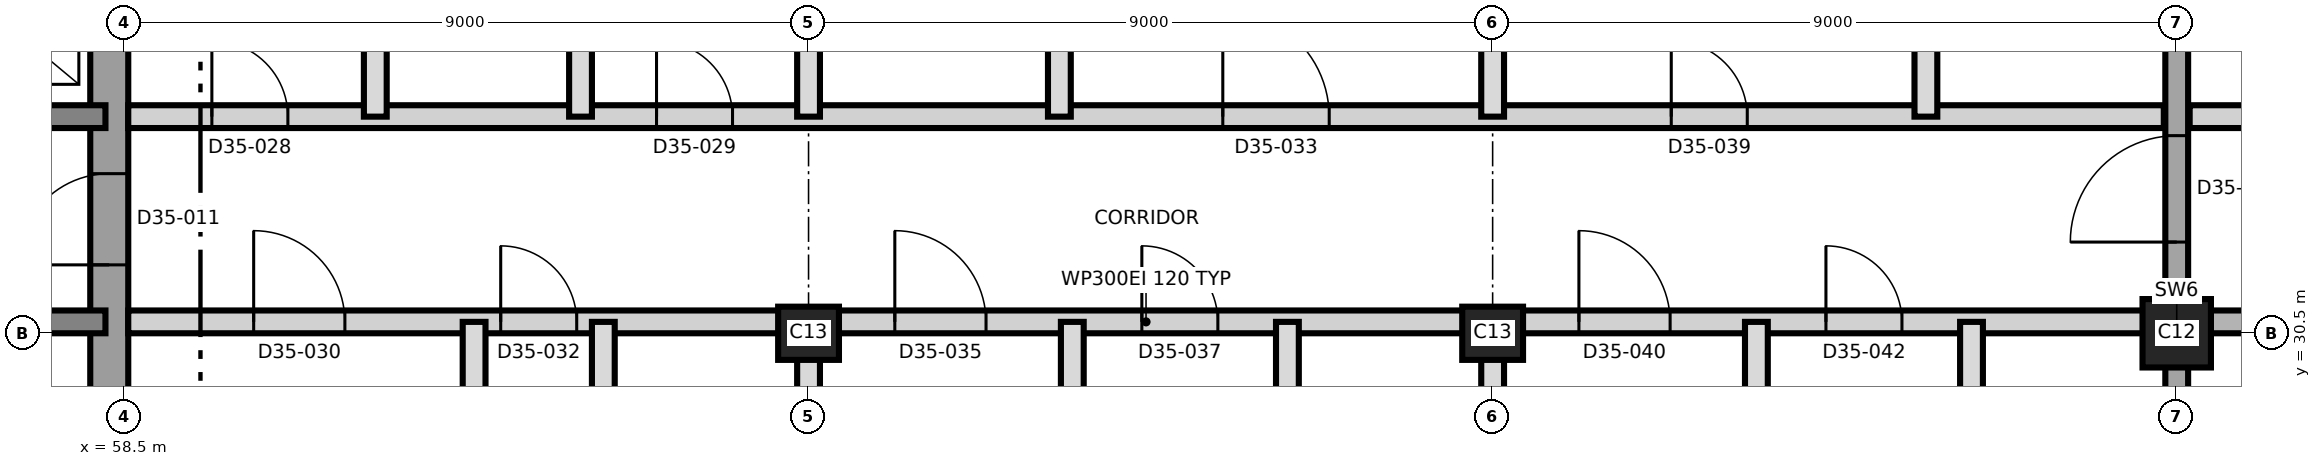
"""IFC4 building model, lengths in metres.
Left out: names, types, materials, properties, quantities, classifications, styles, units other than length and angle.
Written with IfcOpenShell. Run it as: python <this file> out.ifc"""

import sys

from ifc_helpers import new_model, si_unit, direction, frame, frame_2d, origin, origin_2d, place, context, subcontext, project, spatial, rectangle, extrude, element, fill, save


model = new_model("IFC4")
c1 = context("Model", 3, precision=1e-05, world=origin(), true_north=direction((0.0, 1.0)))
c2 = subcontext(c1, "Body", "Model", "MODEL_VIEW")
j1 = project(units=[si_unit("LENGTHUNIT", "METRE"), si_unit("PLANEANGLEUNIT", "RADIAN")], contexts=[c1])
p1 = place(None, origin())
s1 = spatial("IfcSite", under=j1, at=p1, CompositionType="ELEMENT")
p2 = place(p1, origin())
s2 = spatial("IfcBuilding", under=s1, at=p2, CompositionType="ELEMENT")
p3 = place(p2, frame((0.0, 0.0, 195.8)))
s3 = spatial("IfcBuildingStorey", under=s2, at=p3, CompositionType="ELEMENT", Elevation=195.8)
p4 = place(p3, frame((58.3, 21.25, 0.0), z_axis=(0.0, 0.0, 1.0), x_axis=(0.0, 1.0, 0.0)))
e1 = element("IfcWall", 1, at=p4, inside=s3, PredefinedType="SHEAR", context=c2, shape_type="SweptSolid", body=[
    extrude(rectangle(XDim=18.5, YDim=0.5, at=frame_2d((9.25, 0.0))), origin(), (0.0, 0.0, 1.0), 3.7),
])
p5 = place(p4, frame((10.15, 0.0, 0.0)))
e2 = element("IfcOpeningElement", 2, at=p5, cuts=e1, PredefinedType="OPENING", context=c2, shape_type="SweptSolid", body=[
    extrude(rectangle(XDim=1.2, YDim=2.1, at=frame_2d((0.6, 1.05))), frame((0.0, 0.26, 0.0), z_axis=(0.0, -1.0, 0.0), x_axis=(1.0, 0.0, 0.0)), (0.0, 0.0, 1.0), 0.52),
])
p6 = place(p3, frame((31.75, 30.65, 0.0), z_axis=(0.0, 0.0, 1.0), x_axis=(1.0, 0.0, 0.0)))
e3 = element("IfcWall", 3, at=p6, inside=s3, PredefinedType="SHEAR", context=c2, shape_type="SweptSolid", body=[
    extrude(rectangle(XDim=26.5, YDim=0.3, at=frame_2d((13.25, 0.0))), origin(), (0.0, 0.0, 1.0), 3.7),
])
p7 = place(p6, frame((24.75, 0.0, 0.0)))
e4 = element("IfcOpeningElement", 4, at=p7, cuts=e3, PredefinedType="OPENING", context=c2, shape_type="SweptSolid", body=[
    extrude(rectangle(XDim=1.0, YDim=2.1, at=frame_2d((0.5, 1.05))), frame((0.0, 0.16, 0.0), z_axis=(0.0, -1.0, 0.0), x_axis=(1.0, 0.0, 0.0)), (0.0, 0.0, 1.0), 0.32),
])
p8 = place(p6, frame((4.05, 0.0, 0.0)))
e5 = element("IfcOpeningElement", 5, at=p8, cuts=e3, PredefinedType="OPENING", context=c2, shape_type="SweptSolid", body=[
    extrude(rectangle(XDim=1.0, YDim=2.1, at=frame_2d((0.5, 1.05))), frame((0.0, 0.16, 0.0), z_axis=(0.0, -1.0, 0.0), x_axis=(1.0, 0.0, 0.0)), (0.0, 0.0, 1.0), 0.32),
])
p9 = place(p3, frame((31.75, 33.35, 0.0), z_axis=(0.0, 0.0, 1.0), x_axis=(1.0, 0.0, 0.0)))
e6 = element("IfcWall", 6, at=p9, inside=s3, PredefinedType="SHEAR", context=c2, shape_type="SweptSolid", body=[
    extrude(rectangle(XDim=26.5, YDim=0.3, at=frame_2d((13.25, 0.0))), origin(), (0.0, 0.0, 1.0), 3.7),
])
p10 = place(p9, frame((13.9, 0.0, 0.0)))
e7 = element("IfcOpeningElement", 7, at=p10, cuts=e6, PredefinedType="OPENING", context=c2, shape_type="SweptSolid", body=[
    extrude(rectangle(XDim=1.4, YDim=2.1, at=frame_2d((0.7, 1.05))), frame((0.0, 0.16, 0.0), z_axis=(0.0, -1.0, 0.0), x_axis=(1.0, 0.0, 0.0)), (0.0, 0.0, 1.0), 0.32),
])
p11 = place(p9, frame((5.375, 0.0, 0.0)))
e8 = element("IfcOpeningElement", 8, at=p11, cuts=e6, PredefinedType="OPENING", context=c2, shape_type="SweptSolid", body=[
    extrude(rectangle(XDim=1.2, YDim=2.1, at=frame_2d((0.6, 1.05))), frame((0.0, 0.16, 0.0), z_axis=(0.0, -1.0, 0.0), x_axis=(1.0, 0.0, 0.0)), (0.0, 0.0, 1.0), 0.32),
])
p12 = place(p9, frame((19.925, 0.0, 0.0)))
e9 = element("IfcOpeningElement", 9, at=p12, cuts=e6, PredefinedType="OPENING", context=c2, shape_type="SweptSolid", body=[
    extrude(rectangle(XDim=1.2, YDim=2.1, at=frame_2d((0.6, 1.05))), frame((0.0, 0.16, 0.0), z_axis=(0.0, -1.0, 0.0), x_axis=(1.0, 0.0, 0.0)), (0.0, 0.0, 1.0), 0.32),
])
for number, where, z_axis, x_axis in (
    (10, (67.5, 30.5, 0.0), (0.0, 0.0, 1.0), (1.0, 0.0, 0.0)),
    (11, (76.5, 30.5, 0.0), (0.0, 0.0, 1.0), (1.0, 0.0, 0.0)),
):
    element("IfcColumn", number, at=place(p3, frame(where, z_axis=z_axis, x_axis=x_axis)), inside=s3, PredefinedType="COLUMN", context=c2, shape_type="SweptSolid", body=[
        extrude(rectangle(XDim=0.8, YDim=0.7, at=origin_2d()), origin(), (0.0, 0.0, 1.0), 3.7),
    ])
p13 = place(p3, frame((85.5, 30.5, 0.0), z_axis=(0.0, 0.0, 1.0), x_axis=(1.0, 0.0, 0.0)))
e12 = element("IfcColumn", 12, at=p13, inside=s3, PredefinedType="COLUMN", context=c2, shape_type="SweptSolid", body=[
    extrude(rectangle(XDim=0.9, YDim=0.9, at=origin_2d()), origin(), (0.0, 0.0, 1.0), 3.7),
])
p14 = place(p3, frame((85.5, 20.135, 0.0), z_axis=(0.0, 0.0, 1.0), x_axis=(0.0, 1.0, 0.0)))
e13 = element("IfcWall", 13, at=p14, inside=s3, PredefinedType="SHEAR", context=c2, shape_type="SweptSolid", body=[
    extrude(rectangle(XDim=20.73, YDim=0.3, at=frame_2d((10.365, 0.0))), origin(), (0.0, 0.0, 1.0), 3.7),
])
p15 = place(p14, frame((11.565, 0.0, 0.0)))
e14 = element("IfcOpeningElement", 14, at=p15, cuts=e13, PredefinedType="OPENING", context=c2, shape_type="SweptSolid", body=[
    extrude(rectangle(XDim=1.4, YDim=2.1, at=frame_2d((0.7, 1.05))), frame((0.0, 0.16, 0.0), z_axis=(0.0, -1.0, 0.0), x_axis=(1.0, 0.0, 0.0)), (0.0, 0.0, 1.0), 0.32),
])
p16 = place(p3, frame((58.55, 30.65, 0.0), z_axis=(0.0, 0.0, 1.0), x_axis=(1.0, 0.0, 0.0)))
e15 = element("IfcWall", 15, at=p16, inside=s3, PredefinedType="PARTITIONING", context=c2, shape_type="SweptSolid", body=[
    extrude(rectangle(XDim=26.78, YDim=0.3, at=frame_2d((13.39, 0.0))), origin(), (0.0, 0.0, 1.0), 3.4),
])
p17 = place(p16, frame((1.65, 0.0, 0.0)))
e16 = element("IfcOpeningElement", 16, at=p17, cuts=e15, PredefinedType="OPENING", context=c2, shape_type="SweptSolid", body=[
    extrude(rectangle(XDim=1.2, YDim=2.1, at=frame_2d((0.6, 1.05))), frame((0.0, 0.16, 0.0), z_axis=(0.0, -1.0, 0.0), x_axis=(1.0, 0.0, 0.0)), (0.0, 0.0, 1.0), 0.32),
])
p18 = place(p16, frame((4.9, 0.0, 0.0)))
e17 = element("IfcOpeningElement", 17, at=p18, cuts=e15, PredefinedType="OPENING", context=c2, shape_type="SweptSolid", body=[
    extrude(rectangle(XDim=1.0, YDim=2.1, at=frame_2d((0.5, 1.05))), frame((0.0, 0.16, 0.0), z_axis=(0.0, -1.0, 0.0), x_axis=(1.0, 0.0, 0.0)), (0.0, 0.0, 1.0), 0.32),
])
p19 = place(p16, frame((10.085, 0.0, 0.0)))
e18 = element("IfcOpeningElement", 18, at=p19, cuts=e15, PredefinedType="OPENING", context=c2, shape_type="SweptSolid", body=[
    extrude(rectangle(XDim=1.2, YDim=2.1, at=frame_2d((0.6, 1.05))), frame((0.0, 0.16, 0.0), z_axis=(0.0, -1.0, 0.0), x_axis=(1.0, 0.0, 0.0)), (0.0, 0.0, 1.0), 0.32),
])
p20 = place(p16, frame((13.335, 0.0, 0.0)))
e19 = element("IfcOpeningElement", 19, at=p20, cuts=e15, PredefinedType="OPENING", context=c2, shape_type="SweptSolid", body=[
    extrude(rectangle(XDim=1.0, YDim=2.1, at=frame_2d((0.5, 1.05))), frame((0.0, 0.16, 0.0), z_axis=(0.0, -1.0, 0.0), x_axis=(1.0, 0.0, 0.0)), (0.0, 0.0, 1.0), 0.32),
])
p21 = place(p16, frame((19.085, 0.0, 0.0)))
e20 = element("IfcOpeningElement", 20, at=p21, cuts=e15, PredefinedType="OPENING", context=c2, shape_type="SweptSolid", body=[
    extrude(rectangle(XDim=1.2, YDim=2.1, at=frame_2d((0.6, 1.05))), frame((0.0, 0.16, 0.0), z_axis=(0.0, -1.0, 0.0), x_axis=(1.0, 0.0, 0.0)), (0.0, 0.0, 1.0), 0.32),
])
p22 = place(p16, frame((22.335, 0.0, 0.0)))
e21 = element("IfcOpeningElement", 21, at=p22, cuts=e15, PredefinedType="OPENING", context=c2, shape_type="SweptSolid", body=[
    extrude(rectangle(XDim=1.0, YDim=2.1, at=frame_2d((0.5, 1.05))), frame((0.0, 0.16, 0.0), z_axis=(0.0, -1.0, 0.0), x_axis=(1.0, 0.0, 0.0)), (0.0, 0.0, 1.0), 0.32),
])
p23 = place(p3, frame((85.67, 30.65, 0.0), z_axis=(0.0, 0.0, 1.0), x_axis=(1.0, 0.0, 0.0)))
e22 = element("IfcWall", 22, at=p23, inside=s3, PredefinedType="SHEAR", context=c2, shape_type="SweptSolid", body=[
    extrude(rectangle(XDim=9.58, YDim=0.3, at=frame_2d((4.79, 0.0))), origin(), (0.0, 0.0, 1.0), 3.4),
])
p24 = place(p23, frame((2.08, 0.0, 0.0)))
e23 = element("IfcOpeningElement", 23, at=p24, cuts=e22, PredefinedType="OPENING", context=c2, shape_type="SweptSolid", body=[
    extrude(rectangle(XDim=1.2, YDim=2.1, at=frame_2d((0.6, 1.05))), frame((0.0, 0.16, 0.0), z_axis=(0.0, -1.0, 0.0), x_axis=(1.0, 0.0, 0.0)), (0.0, 0.0, 1.0), 0.32),
])
p25 = place(p23, frame((5.63, 0.0, 0.0)))
e24 = element("IfcOpeningElement", 24, at=p25, cuts=e22, PredefinedType="OPENING", context=c2, shape_type="SweptSolid", body=[
    extrude(rectangle(XDim=1.0, YDim=2.1, at=frame_2d((0.5, 1.05))), frame((0.0, 0.16, 0.0), z_axis=(0.0, -1.0, 0.0), x_axis=(1.0, 0.0, 0.0)), (0.0, 0.0, 1.0), 0.32),
])
p26 = place(p3, frame((58.55, 33.35, 0.0), z_axis=(0.0, 0.0, 1.0), x_axis=(1.0, 0.0, 0.0)))
e25 = element("IfcWall", 25, at=p26, inside=s3, PredefinedType="PARTITIONING", context=c2, shape_type="SweptSolid", body=[
    extrude(rectangle(XDim=26.78, YDim=0.3, at=frame_2d((13.39, 0.0))), origin(), (0.0, 0.0, 1.0), 3.4),
])
p27 = place(p26, frame((1.1, 0.0, 0.0)))
e26 = element("IfcOpeningElement", 26, at=p27, cuts=e25, PredefinedType="OPENING", context=c2, shape_type="SweptSolid", body=[
    extrude(rectangle(XDim=1.0, YDim=2.1, at=frame_2d((0.5, 1.05))), frame((0.0, 0.16, 0.0), z_axis=(0.0, -1.0, 0.0), x_axis=(1.0, 0.0, 0.0)), (0.0, 0.0, 1.0), 0.32),
])
p28 = place(p26, frame((6.95, 0.0, 0.0)))
e27 = element("IfcOpeningElement", 27, at=p28, cuts=e25, PredefinedType="OPENING", context=c2, shape_type="SweptSolid", body=[
    extrude(rectangle(XDim=1.0, YDim=2.1, at=frame_2d((0.5, 1.05))), frame((0.0, 0.16, 0.0), z_axis=(0.0, -1.0, 0.0), x_axis=(1.0, 0.0, 0.0)), (0.0, 0.0, 1.0), 0.32),
])
p29 = place(p26, frame((14.4, 0.0, 0.0)))
e28 = element("IfcOpeningElement", 28, at=p29, cuts=e25, PredefinedType="OPENING", context=c2, shape_type="SweptSolid", body=[
    extrude(rectangle(XDim=1.4, YDim=2.4, at=frame_2d((0.7, 1.2))), frame((0.0, 0.16, 0.0), z_axis=(0.0, -1.0, 0.0), x_axis=(1.0, 0.0, 0.0)), (0.0, 0.0, 1.0), 0.32),
])
p30 = place(p26, frame((20.3, 0.0, 0.0)))
e29 = element("IfcOpeningElement", 29, at=p30, cuts=e25, PredefinedType="OPENING", context=c2, shape_type="SweptSolid", body=[
    extrude(rectangle(XDim=1.0, YDim=2.4, at=frame_2d((0.5, 1.2))), frame((0.0, 0.16, 0.0), z_axis=(0.0, -1.0, 0.0), x_axis=(1.0, 0.0, 0.0)), (0.0, 0.0, 1.0), 0.32),
])
p31 = place(p3, frame((85.67, 33.35, 0.0), z_axis=(0.0, 0.0, 1.0), x_axis=(1.0, 0.0, 0.0)))
e30 = element("IfcWall", 30, at=p31, inside=s3, PredefinedType="PARTITIONING", context=c2, shape_type="SweptSolid", body=[
    extrude(rectangle(XDim=9.58, YDim=0.3, at=frame_2d((4.79, 0.0))), origin(), (0.0, 0.0, 1.0), 3.4),
])
p32 = place(p31, frame((1.83, 0.0, 0.0)))
e31 = element("IfcOpeningElement", 31, at=p32, cuts=e30, PredefinedType="OPENING", context=c2, shape_type="SweptSolid", body=[
    extrude(rectangle(XDim=1.0, YDim=2.1, at=frame_2d((0.5, 1.05))), frame((0.0, 0.16, 0.0), z_axis=(0.0, -1.0, 0.0), x_axis=(1.0, 0.0, 0.0)), (0.0, 0.0, 1.0), 0.32),
])
p33 = place(p31, frame((5.63, 0.0, 0.0)))
e32 = element("IfcOpeningElement", 32, at=p33, cuts=e30, PredefinedType="OPENING", context=c2, shape_type="SweptSolid", body=[
    extrude(rectangle(XDim=1.0, YDim=2.1, at=frame_2d((0.5, 1.05))), frame((0.0, 0.16, 0.0), z_axis=(0.0, -1.0, 0.0), x_axis=(1.0, 0.0, 0.0)), (0.0, 0.0, 1.0), 0.32),
])
p34 = place(p3, frame((61.8, 33.35, 0.0), z_axis=(0.0, 0.0, 1.0), x_axis=(0.0, 1.0, 0.0)))
e33 = element("IfcWall", 33, at=p34, inside=s3, PredefinedType="PARTITIONING", context=c2, shape_type="SweptSolid", body=[
    extrude(rectangle(XDim=3.2, YDim=0.3, at=frame_2d((1.6, 0.0))), origin(), (0.0, 0.0, 1.0), 3.4),
])
p35 = place(p3, frame((63.1, 20.135, 0.0), z_axis=(0.0, 0.0, 1.0), x_axis=(0.0, 1.0, 0.0)))
e34 = element("IfcWall", 34, at=p35, inside=s3, PredefinedType="PARTITIONING", context=c2, shape_type="SweptSolid", body=[
    extrude(rectangle(XDim=10.515, YDim=0.3, at=frame_2d((5.257, 0.0))), origin(), (0.0, 0.0, 1.0), 3.4),
])
p36 = place(p3, frame((64.5, 33.35, 0.0), z_axis=(0.0, 0.0, 1.0), x_axis=(0.0, 1.0, 0.0)))
e35 = element("IfcWall", 35, at=p36, inside=s3, PredefinedType="PARTITIONING", context=c2, shape_type="SweptSolid", body=[
    extrude(rectangle(XDim=7.695, YDim=0.3, at=frame_2d((3.847, 0.0))), origin(), (0.0, 0.0, 1.0), 3.4),
])
p37 = place(p3, frame((64.8, 27.45, 0.0), z_axis=(0.0, 0.0, 1.0), x_axis=(0.0, 1.0, 0.0)))
e36 = element("IfcWall", 36, at=p37, inside=s3, PredefinedType="PARTITIONING", context=c2, shape_type="SweptSolid", body=[
    extrude(rectangle(XDim=3.2, YDim=0.3, at=frame_2d((1.6, 0.0))), origin(), (0.0, 0.0, 1.0), 3.4),
])
p38 = place(p3, frame((67.5, 20.135, 0.0), z_axis=(0.0, 0.0, 1.0), x_axis=(0.0, 1.0, 0.0)))
e37 = element("IfcWall", 37, at=p38, inside=s3, PredefinedType="PARTITIONING", context=c2, shape_type="SweptSolid", body=[
    extrude(rectangle(XDim=10.515, YDim=0.3, at=frame_2d((5.257, 0.0))), origin(), (0.0, 0.0, 1.0), 3.4),
])
p39 = place(p3, frame((67.5, 33.35, 0.0), z_axis=(0.0, 0.0, 1.0), x_axis=(0.0, 1.0, 0.0)))
e38 = element("IfcWall", 38, at=p39, inside=s3, PredefinedType="PARTITIONING", context=c2, shape_type="SweptSolid", body=[
    extrude(rectangle(XDim=7.655, YDim=0.3, at=frame_2d((3.827, 0.0))), origin(), (0.0, 0.0, 1.0), 3.4),
])
p40 = place(p3, frame((70.8, 33.35, 0.0), z_axis=(0.0, 0.0, 1.0), x_axis=(0.0, 1.0, 0.0)))
e39 = element("IfcWall", 39, at=p40, inside=s3, PredefinedType="PARTITIONING", context=c2, shape_type="SweptSolid", body=[
    extrude(rectangle(XDim=3.5, YDim=0.3, at=frame_2d((1.75, 0.0))), origin(), (0.0, 0.0, 1.0), 3.4),
])
p41 = place(p3, frame((70.97, 20.135, 0.0), z_axis=(0.0, 0.0, 1.0), x_axis=(0.0, 1.0, 0.0)))
e40 = element("IfcWall", 40, at=p41, inside=s3, PredefinedType="PARTITIONING", context=c2, shape_type="SweptSolid", body=[
    extrude(rectangle(XDim=10.515, YDim=0.3, at=frame_2d((5.257, 0.0))), origin(), (0.0, 0.0, 1.0), 3.4),
])
p42 = place(p3, frame((73.8, 27.45, 0.0), z_axis=(0.0, 0.0, 1.0), x_axis=(0.0, 1.0, 0.0)))
e41 = element("IfcWall", 41, at=p42, inside=s3, PredefinedType="PARTITIONING", context=c2, shape_type="SweptSolid", body=[
    extrude(rectangle(XDim=3.2, YDim=0.3, at=frame_2d((1.6, 0.0))), origin(), (0.0, 0.0, 1.0), 3.4),
])
p43 = place(p3, frame((76.5, 20.135, 0.0), z_axis=(0.0, 0.0, 1.0), x_axis=(0.0, 1.0, 0.0)))
e42 = element("IfcWall", 42, at=p43, inside=s3, PredefinedType="PARTITIONING", context=c2, shape_type="SweptSolid", body=[
    extrude(rectangle(XDim=10.515, YDim=0.3, at=frame_2d((5.257, 0.0))), origin(), (0.0, 0.0, 1.0), 3.4),
])
p44 = place(p3, frame((76.5, 33.35, 0.0), z_axis=(0.0, 0.0, 1.0), x_axis=(0.0, 1.0, 0.0)))
e43 = element("IfcWall", 43, at=p44, inside=s3, PredefinedType="PARTITIONING", context=c2, shape_type="SweptSolid", body=[
    extrude(rectangle(XDim=7.655, YDim=0.3, at=frame_2d((3.827, 0.0))), origin(), (0.0, 0.0, 1.0), 3.4),
])
p45 = place(p3, frame((79.97, 20.135, 0.0), z_axis=(0.0, 0.0, 1.0), x_axis=(0.0, 1.0, 0.0)))
e44 = element("IfcWall", 44, at=p45, inside=s3, PredefinedType="PARTITIONING", context=c2, shape_type="SweptSolid", body=[
    extrude(rectangle(XDim=10.515, YDim=0.3, at=frame_2d((5.257, 0.0))), origin(), (0.0, 0.0, 1.0), 3.4),
])
p46 = place(p3, frame((82.2, 33.35, 0.0), z_axis=(0.0, 0.0, 1.0), x_axis=(0.0, 1.0, 0.0)))
e45 = element("IfcWall", 45, at=p46, inside=s3, PredefinedType="PARTITIONING", context=c2, shape_type="SweptSolid", body=[
    extrude(rectangle(XDim=3.5, YDim=0.3, at=frame_2d((1.75, 0.0))), origin(), (0.0, 0.0, 1.0), 3.4),
])
p47 = place(p3, frame((82.8, 27.45, 0.0), z_axis=(0.0, 0.0, 1.0), x_axis=(0.0, 1.0, 0.0)))
e46 = element("IfcWall", 46, at=p47, inside=s3, PredefinedType="PARTITIONING", context=c2, shape_type="SweptSolid", body=[
    extrude(rectangle(XDim=3.2, YDim=0.3, at=frame_2d((1.6, 0.0))), origin(), (0.0, 0.0, 1.0), 3.4),
])
p48 = place(p5, origin())
e47 = element("IfcDoor", 47, at=p48, inside=s3, OperationType="SINGLE_SWING_LEFT", PredefinedType="DOOR", context=c2, shape_type="SweptSolid", body=[
    extrude(rectangle(XDim=1.2, YDim=2.1, at=frame_2d((0.6, 1.05))), frame((0.0, 0.025, 0.0), z_axis=(0.0, -1.0, 0.0), x_axis=(1.0, 0.0, 0.0)), (0.0, 0.0, 1.0), 0.05),
])
fill(e2, e47)
p49 = place(p27, origin())
e48 = element("IfcDoor", 48, at=p49, inside=s3, OperationType="SINGLE_SWING_LEFT", PredefinedType="DOOR", context=c2, shape_type="SweptSolid", body=[
    extrude(rectangle(XDim=1.0, YDim=2.1, at=frame_2d((0.5, 1.05))), frame((0.0, 0.025, 0.0), z_axis=(0.0, -1.0, 0.0), x_axis=(1.0, 0.0, 0.0)), (0.0, 0.0, 1.0), 0.05),
])
fill(e26, e48)
p50 = place(p28, origin())
e49 = element("IfcDoor", 49, at=p50, inside=s3, OperationType="SINGLE_SWING_RIGHT", PredefinedType="DOOR", context=c2, shape_type="SweptSolid", body=[
    extrude(rectangle(XDim=1.0, YDim=2.1, at=frame_2d((0.5, 1.05))), frame((0.0, 0.025, 0.0), z_axis=(0.0, -1.0, 0.0), x_axis=(1.0, 0.0, 0.0)), (0.0, 0.0, 1.0), 0.05),
])
fill(e27, e49)
p51 = place(p17, origin())
e50 = element("IfcDoor", 50, at=p51, inside=s3, OperationType="SINGLE_SWING_LEFT", PredefinedType="DOOR", context=c2, shape_type="SweptSolid", body=[
    extrude(rectangle(XDim=1.2, YDim=2.1, at=frame_2d((0.6, 1.05))), frame((0.0, 0.025, 0.0), z_axis=(0.0, -1.0, 0.0), x_axis=(1.0, 0.0, 0.0)), (0.0, 0.0, 1.0), 0.05),
])
fill(e16, e50)
p52 = place(p18, origin())
e51 = element("IfcDoor", 51, at=p52, inside=s3, OperationType="SINGLE_SWING_LEFT", PredefinedType="DOOR", context=c2, shape_type="SweptSolid", body=[
    extrude(rectangle(XDim=1.0, YDim=2.1, at=frame_2d((0.5, 1.05))), frame((0.0, 0.025, 0.0), z_axis=(0.0, -1.0, 0.0), x_axis=(1.0, 0.0, 0.0)), (0.0, 0.0, 1.0), 0.05),
])
fill(e17, e51)
p53 = place(p29, origin())
e52 = element("IfcDoor", 52, at=p53, inside=s3, OperationType="SINGLE_SWING_LEFT", PredefinedType="DOOR", context=c2, shape_type="SweptSolid", body=[
    extrude(rectangle(XDim=1.4, YDim=2.4, at=frame_2d((0.7, 1.2))), frame((0.0, 0.025, 0.0), z_axis=(0.0, -1.0, 0.0), x_axis=(1.0, 0.0, 0.0)), (0.0, 0.0, 1.0), 0.05),
])
fill(e28, e52)
p54 = place(p19, origin())
e53 = element("IfcDoor", 53, at=p54, inside=s3, OperationType="SINGLE_SWING_RIGHT", PredefinedType="DOOR", context=c2, shape_type="SweptSolid", body=[
    extrude(rectangle(XDim=1.2, YDim=2.1, at=frame_2d((0.6, 1.05))), frame((0.0, 0.025, 0.0), z_axis=(0.0, -1.0, 0.0), x_axis=(1.0, 0.0, 0.0)), (0.0, 0.0, 1.0), 0.05),
])
fill(e18, e53)
p55 = place(p20, origin())
e54 = element("IfcDoor", 54, at=p55, inside=s3, OperationType="SINGLE_SWING_LEFT", PredefinedType="DOOR", context=c2, shape_type="SweptSolid", body=[
    extrude(rectangle(XDim=1.0, YDim=2.1, at=frame_2d((0.5, 1.05))), frame((0.0, 0.025, 0.0), z_axis=(0.0, -1.0, 0.0), x_axis=(1.0, 0.0, 0.0)), (0.0, 0.0, 1.0), 0.05),
])
fill(e19, e54)
p56 = place(p30, origin())
e55 = element("IfcDoor", 55, at=p56, inside=s3, OperationType="SINGLE_SWING_RIGHT", PredefinedType="DOOR", context=c2, shape_type="SweptSolid", body=[
    extrude(rectangle(XDim=1.0, YDim=2.4, at=frame_2d((0.5, 1.2))), frame((0.0, 0.025, 0.0), z_axis=(0.0, -1.0, 0.0), x_axis=(1.0, 0.0, 0.0)), (0.0, 0.0, 1.0), 0.05),
])
fill(e29, e55)
p57 = place(p21, origin())
e56 = element("IfcDoor", 56, at=p57, inside=s3, OperationType="SINGLE_SWING_LEFT", PredefinedType="DOOR", context=c2, shape_type="SweptSolid", body=[
    extrude(rectangle(XDim=1.2, YDim=2.1, at=frame_2d((0.6, 1.05))), frame((0.0, 0.025, 0.0), z_axis=(0.0, -1.0, 0.0), x_axis=(1.0, 0.0, 0.0)), (0.0, 0.0, 1.0), 0.05),
])
fill(e20, e56)
p58 = place(p22, origin())
e57 = element("IfcDoor", 57, at=p58, inside=s3, OperationType="SINGLE_SWING_RIGHT", PredefinedType="DOOR", context=c2, shape_type="SweptSolid", body=[
    extrude(rectangle(XDim=1.0, YDim=2.1, at=frame_2d((0.5, 1.05))), frame((0.0, 0.025, 0.0), z_axis=(0.0, -1.0, 0.0), x_axis=(1.0, 0.0, 0.0)), (0.0, 0.0, 1.0), 0.05),
])
fill(e21, e57)
p59 = place(p15, origin())
e58 = element("IfcDoor", 58, at=p59, inside=s3, OperationType="SINGLE_SWING_RIGHT", PredefinedType="DOOR", context=c2, shape_type="SweptSolid", body=[
    extrude(rectangle(XDim=1.4, YDim=2.1, at=frame_2d((0.7, 1.05))), frame((0.0, 0.025, 0.0), z_axis=(0.0, -1.0, 0.0), x_axis=(1.0, 0.0, 0.0)), (0.0, 0.0, 1.0), 0.05),
])
fill(e14, e58)
save(model, sys.argv[1])
